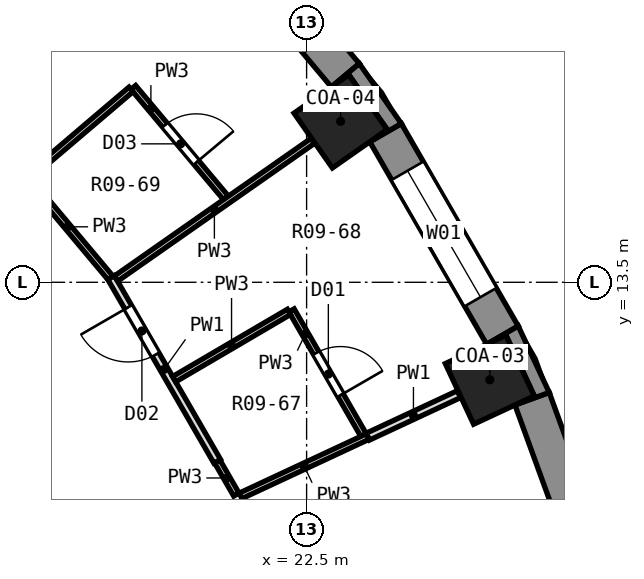
"""IFC4 building model, lengths in metres.
Left out: names, types, materials, properties, quantities, classifications, styles, units other than length and angle.
Written with IfcOpenShell. Run it as: python <this file> out.ifc"""

import sys

from ifc_helpers import new_model, si_unit, direction, frame, frame_2d, origin, origin_2d, place, context, subcontext, project, spatial, polyline, rectangle, outline, extrude, element, fill, save


model = new_model("IFC4")
c1 = context("Model", 3, precision=1e-05, world=origin(), true_north=direction((0.0, 1.0)))
c2 = subcontext(c1, "Body", "Model", "MODEL_VIEW")
j1 = project(units=[si_unit("LENGTHUNIT", "METRE"), si_unit("PLANEANGLEUNIT", "RADIAN")], contexts=[c1])
p1 = place(None, origin())
s1 = spatial("IfcSite", under=j1, at=p1, CompositionType="ELEMENT")
p2 = place(p1, origin())
s2 = spatial("IfcBuilding", under=s1, at=p2, CompositionType="ELEMENT")
p3 = place(p2, frame((0.0, 0.0, 26.3)))
s3 = spatial("IfcBuildingStorey", under=s2, at=p3, CompositionType="ELEMENT", Elevation=26.3)
p4 = place(p3, frame((25.512, 11.897, 0.0), z_axis=(0.0, 0.0, 1.0), x_axis=(0.906307787037, 0.422618261741, 0.0)))
e1 = element("IfcColumn", 1, at=p4, inside=s3, PredefinedType="COLUMN", context=c2, shape_type="SweptSolid", body=[
    extrude(rectangle(XDim=1.1, YDim=1.1, at=origin_2d()), origin(), (0.0, 0.0, 1.0), 3.3),
])
p5 = place(p3, frame((23.059, 16.146, -0.55), z_axis=(0.0, 0.0, 1.0), x_axis=(0.819152044289, 0.573576436351, 0.0)))
e2 = element("IfcColumn", 2, at=p5, inside=s3, PredefinedType="COLUMN", context=c2, shape_type="SweptSolid", body=[
    extrude(rectangle(XDim=1.1, YDim=1.1, at=origin_2d()), origin(), (0.0, 0.0, 1.0), 3.85),
])
p6 = place(p3, frame((27.523, 7.971, 0.0), z_axis=(0.0, 0.0, 1.0), x_axis=(-0.342028474173, 0.939689588564, 0.0)))
e3 = element("IfcWall", 3, at=p6, inside=s3, PredefinedType="SOLIDWALL", context=c2, shape_type="SweptSolid", body=[
    extrude(rectangle(XDim=3.846, YDim=0.6, at=frame_2d((1.923, 0.0))), origin(), (0.0, 0.0, 1.0), 2.75),
])
p7 = place(p3, frame((25.721, 12.63, 0.0), z_axis=(0.0, 0.0, 1.0), x_axis=(-0.499989888488, 0.86603124159, 0.0)))
e4 = element("IfcWall", 4, at=p7, inside=s3, PredefinedType="SOLIDWALL", context=c2, shape_type="SweptSolid", body=[
    extrude(rectangle(XDim=3.846, YDim=0.6, at=frame_2d((1.923, 0.0))), origin(), (0.0, 0.0, 1.0), 2.75),
])
p8 = place(p7, frame((0.723, 0.0, 0.9)))
e5 = element("IfcOpeningElement", 5, at=p8, cuts=e4, PredefinedType="OPENING", context=c2, shape_type="SweptSolid", body=[
    extrude(rectangle(XDim=2.4, YDim=1.8, at=frame_2d((1.2, 0.9))), frame((0.0, 0.312, 0.0), z_axis=(0.0, -1.0, 0.0), x_axis=(1.0, 0.0, 0.0)), (0.0, 0.0, 1.0), 0.624),
])
p9 = place(p3, frame((23.137, 16.904, 0.0), z_axis=(0.0, 0.0, 1.0), x_axis=(-0.642809392687, 0.766026164483, 0.0)))
e6 = element("IfcWall", 6, at=p9, inside=s3, PredefinedType="SOLIDWALL", context=c2, shape_type="SweptSolid", body=[
    extrude(rectangle(XDim=3.846, YDim=0.6, at=frame_2d((1.923, 0.0))), origin(), (0.0, 0.0, 1.0), 2.75),
])
p10 = place(p9, frame((0.723, 0.0, 0.9)))
e7 = element("IfcOpeningElement", 7, at=p10, cuts=e6, PredefinedType="OPENING", context=c2, shape_type="SweptSolid", body=[
    extrude(rectangle(XDim=2.4, YDim=1.8, at=frame_2d((1.2, 0.9))), frame((0.0, 0.312, 0.0), z_axis=(0.0, -1.0, 0.0), x_axis=(1.0, 0.0, 0.0)), (0.0, 0.0, 1.0), 0.624),
])
p11 = place(p3, origin())
e8 = element("IfcWall", 8, at=p11, inside=s3, PredefinedType="SOLIDWALL", context=c2, shape_type="SweptSolid", body=[
    extrude(outline(polyline([(25.981, 12.78), (25.461, 12.479), (25.779, 12.628), (26.243, 11.631), (25.926, 11.483), (26.49, 11.688), (25.981, 12.78)])), origin(), (0.0, 0.0, 1.0), 2.75),
])
p12 = place(p3, origin())
e9 = element("IfcWall", 9, at=p12, inside=s3, PredefinedType="SOLIDWALL", context=c2, shape_type="SweptSolid", body=[
    extrude(outline(polyline([(24.058, 16.11), (23.367, 17.097), (22.907, 16.711), (23.194, 16.912), (23.825, 16.011), (23.538, 15.81), (24.058, 16.11)])), origin(), (0.0, 0.0, 1.0), 2.75),
])
p13 = place(p3, frame((21.029, 10.555, 0.0), z_axis=(0.0, 0.0, 1.0), x_axis=(0.49975591337, -0.86616628141, 0.0)))
e10 = element("IfcWall", 10, at=p13, inside=s3, PredefinedType="PARTITIONING", context=c2, shape_type="SweptSolid", body=[
    extrude(rectangle(XDim=0.632, YDim=0.1, at=frame_2d((0.316, 0.0))), origin(), (0.0, 0.0, 1.0), 2.75),
])
p14 = place(p3, frame((19.283, 13.58, 0.0), z_axis=(0.0, 0.0, 1.0), x_axis=(0.500206547268, -0.865906120818, 0.0)))
e11 = element("IfcWall", 11, at=p14, inside=s3, PredefinedType="PARTITIONING", context=c2, shape_type="SweptSolid", body=[
    extrude(rectangle(XDim=3.492, YDim=0.125, at=frame_2d((1.746, 0.0))), origin(), (0.0, 0.0, 1.0), 2.75),
])
p15 = place(p14, frame((0.566, 0.0, 0.0)))
e12 = element("IfcOpeningElement", 12, at=p15, cuts=e11, PredefinedType="OPENING", context=c2, shape_type="SweptSolid", body=[
    extrude(rectangle(XDim=0.9, YDim=2.1, at=frame_2d((0.45, 1.05))), frame((0.0, 0.074, 0.0), z_axis=(0.0, -1.0, 0.0), x_axis=(1.0, 0.0, 0.0)), (0.0, 0.0, 1.0), 0.149),
])
p16 = place(p3, frame((22.252, 13.038, 0.0), z_axis=(0.0, 0.0, 1.0), x_axis=(0.500073288705, -0.865983086396, 0.0)))
e13 = element("IfcWall", 13, at=p16, inside=s3, PredefinedType="PARTITIONING", context=c2, shape_type="SweptSolid", body=[
    extrude(rectangle(XDim=2.369, YDim=0.1, at=frame_2d((1.185, 0.0))), origin(), (0.0, 0.0, 1.0), 2.75),
])
p17 = place(p16, frame((0.811, 0.0, 0.0)))
e14 = element("IfcOpeningElement", 14, at=p17, cuts=e13, PredefinedType="OPENING", context=c2, shape_type="SweptSolid", body=[
    extrude(rectangle(XDim=0.8, YDim=2.1, at=frame_2d((0.4, 1.05))), frame((0.0, 0.062, 0.0), z_axis=(0.0, -1.0, 0.0), x_axis=(1.0, 0.0, 0.0)), (0.0, 0.0, 1.0), 0.124),
])
p18 = place(p3, frame((17.865, 15.252, 0.0), z_axis=(0.0, 0.0, 1.0), x_axis=(0.642711379907, -0.766108401036, 0.0)))
e15 = element("IfcWall", 15, at=p18, inside=s3, PredefinedType="PARTITIONING", context=c2, shape_type="SweptSolid", body=[
    extrude(rectangle(XDim=2.192, YDim=0.1, at=frame_2d((1.096, 0.0))), origin(), (0.0, 0.0, 1.0), 2.75),
])
p19 = place(p3, frame((19.65, 16.704, 0.0), z_axis=(0.0, 0.0, 1.0), x_axis=(0.642631758034, -0.766175191171, 0.0)))
e16 = element("IfcWall", 16, at=p19, inside=s3, PredefinedType="PARTITIONING", context=c2, shape_type="SweptSolid", body=[
    extrude(rectangle(XDim=2.371, YDim=0.1, at=frame_2d((1.186, 0.0))), origin(), (0.0, 0.0, 1.0), 2.75),
])
p20 = place(p19, frame((0.811, 0.0, 0.0)))
e17 = element("IfcOpeningElement", 17, at=p20, cuts=e16, PredefinedType="OPENING", context=c2, shape_type="SweptSolid", body=[
    extrude(rectangle(XDim=0.8, YDim=2.1, at=frame_2d((0.4, 1.05))), frame((0.0, 0.062, 0.0), z_axis=(0.0, -1.0, 0.0), x_axis=(1.0, 0.0, 0.0)), (0.0, 0.0, 1.0), 0.124),
])
p21 = place(p3, frame((21.414, 9.988, 0.0), z_axis=(0.0, 0.0, 1.0), x_axis=(0.906293839501, 0.42264817104, 0.0)))
e18 = element("IfcWall", 18, at=p21, inside=s3, PredefinedType="PARTITIONING", context=c2, shape_type="SweptSolid", body=[
    extrude(rectangle(XDim=2.309, YDim=0.1, at=frame_2d((1.155, 0.0))), origin(), (0.0, 0.0, 1.0), 2.75),
])
p22 = place(p3, frame((23.508, 10.962, 0.0), z_axis=(0.0, 0.0, 1.0), x_axis=(0.906360566975, 0.422505056339, 0.0)))
e19 = element("IfcWall", 19, at=p22, inside=s3, PredefinedType="PARTITIONING", context=c2, shape_type="SweptSolid", body=[
    extrude(rectangle(XDim=1.651, YDim=0.125, at=frame_2d((0.826, 0.0))), origin(), (0.0, 0.0, 1.0), 2.75),
])
p23 = place(p3, frame((20.322, 11.906, 0.0), z_axis=(0.0, 0.0, 1.0), x_axis=(0.862687894762, 0.505736686657, 0.0)))
e20 = element("IfcWall", 20, at=p23, inside=s3, PredefinedType="PARTITIONING", context=c2, shape_type="SweptSolid", body=[
    extrude(rectangle(XDim=2.187, YDim=0.1, at=frame_2d((1.094, 0.0))), origin(), (0.0, 0.0, 1.0), 2.75),
])
p24 = place(p3, frame((19.366, 13.561, 0.0), z_axis=(0.0, 0.0, 1.0), x_axis=(0.819199961449, 0.57350799747, 0.0)))
e21 = element("IfcWall", 21, at=p24, inside=s3, PredefinedType="PARTITIONING", context=c2, shape_type="SweptSolid", body=[
    extrude(rectangle(XDim=3.948, YDim=0.1, at=frame_2d((1.974, 0.0))), origin(), (0.0, 0.0, 1.0), 2.75),
])
p25 = place(p3, frame((17.936, 15.246, 0.0), z_axis=(0.0, 0.0, 1.0), x_axis=(0.76174213422, 0.647880329192, 0.0)))
e22 = element("IfcWall", 22, at=p25, inside=s3, PredefinedType="PARTITIONING", context=c2, shape_type="SweptSolid", body=[
    extrude(rectangle(XDim=2.2, YDim=0.1, at=frame_2d((1.1, 0.0))), origin(), (0.0, 0.0, 1.0), 2.75),
])
p26 = place(p3, frame((16.717, 16.717, 0.0), z_axis=(0.0, 0.0, 1.0), x_axis=(0.707106781187, 0.707106781187, 0.0)))
e23 = element("IfcWall", 23, at=p26, inside=s3, PredefinedType="PARTITIONING", context=c2, shape_type="SweptSolid", body=[
    extrude(rectangle(XDim=3.948, YDim=0.1, at=frame_2d((1.974, 0.0))), origin(), (0.0, 0.0, 1.0), 2.75),
])
p27 = place(p8, origin())
e24 = element("IfcWindow", 24, at=p27, inside=s3, PartitioningType="SINGLE_PANEL", PredefinedType="WINDOW", context=c2, shape_type="SweptSolid", body=[
    extrude(rectangle(XDim=2.4, YDim=1.8, at=frame_2d((1.2, 0.9))), frame((0.0, 0.18, 0.0), z_axis=(0.0, -1.0, 0.0), x_axis=(1.0, 0.0, 0.0)), (0.0, 0.0, 1.0), 0.06),
])
fill(e5, e24)
p28 = place(p17, origin())
e25 = element("IfcDoor", 25, at=p28, inside=s3, OperationType="SINGLE_SWING_RIGHT", PredefinedType="DOOR", context=c2, shape_type="SweptSolid", body=[
    extrude(rectangle(XDim=0.8, YDim=2.1, at=frame_2d((0.4, 1.05))), frame((0.0, 0.025, 0.0), z_axis=(0.0, -1.0, 0.0), x_axis=(1.0, 0.0, 0.0)), (0.0, 0.0, 1.0), 0.05),
])
fill(e14, e25)
p29 = place(p15, frame((0.9, 0.0, 0.0), z_axis=(0.0, 0.0, 1.0), x_axis=(-1.0, 0.0, 0.0)))
e26 = element("IfcDoor", 26, at=p29, inside=s3, OperationType="SINGLE_SWING_RIGHT", PredefinedType="DOOR", context=c2, shape_type="SweptSolid", body=[
    extrude(rectangle(XDim=0.9, YDim=2.1, at=frame_2d((0.45, 1.05))), frame((0.0, 0.025, 0.0), z_axis=(0.0, -1.0, 0.0), x_axis=(1.0, 0.0, 0.0)), (0.0, 0.0, 1.0), 0.05),
])
fill(e12, e26)
p30 = place(p20, origin())
e27 = element("IfcDoor", 27, at=p30, inside=s3, OperationType="SINGLE_SWING_RIGHT", PredefinedType="DOOR", context=c2, shape_type="SweptSolid", body=[
    extrude(rectangle(XDim=0.8, YDim=2.1, at=frame_2d((0.4, 1.05))), frame((0.0, 0.025, 0.0), z_axis=(0.0, -1.0, 0.0), x_axis=(1.0, 0.0, 0.0)), (0.0, 0.0, 1.0), 0.05),
])
fill(e17, e27)
save(model, sys.argv[1])
